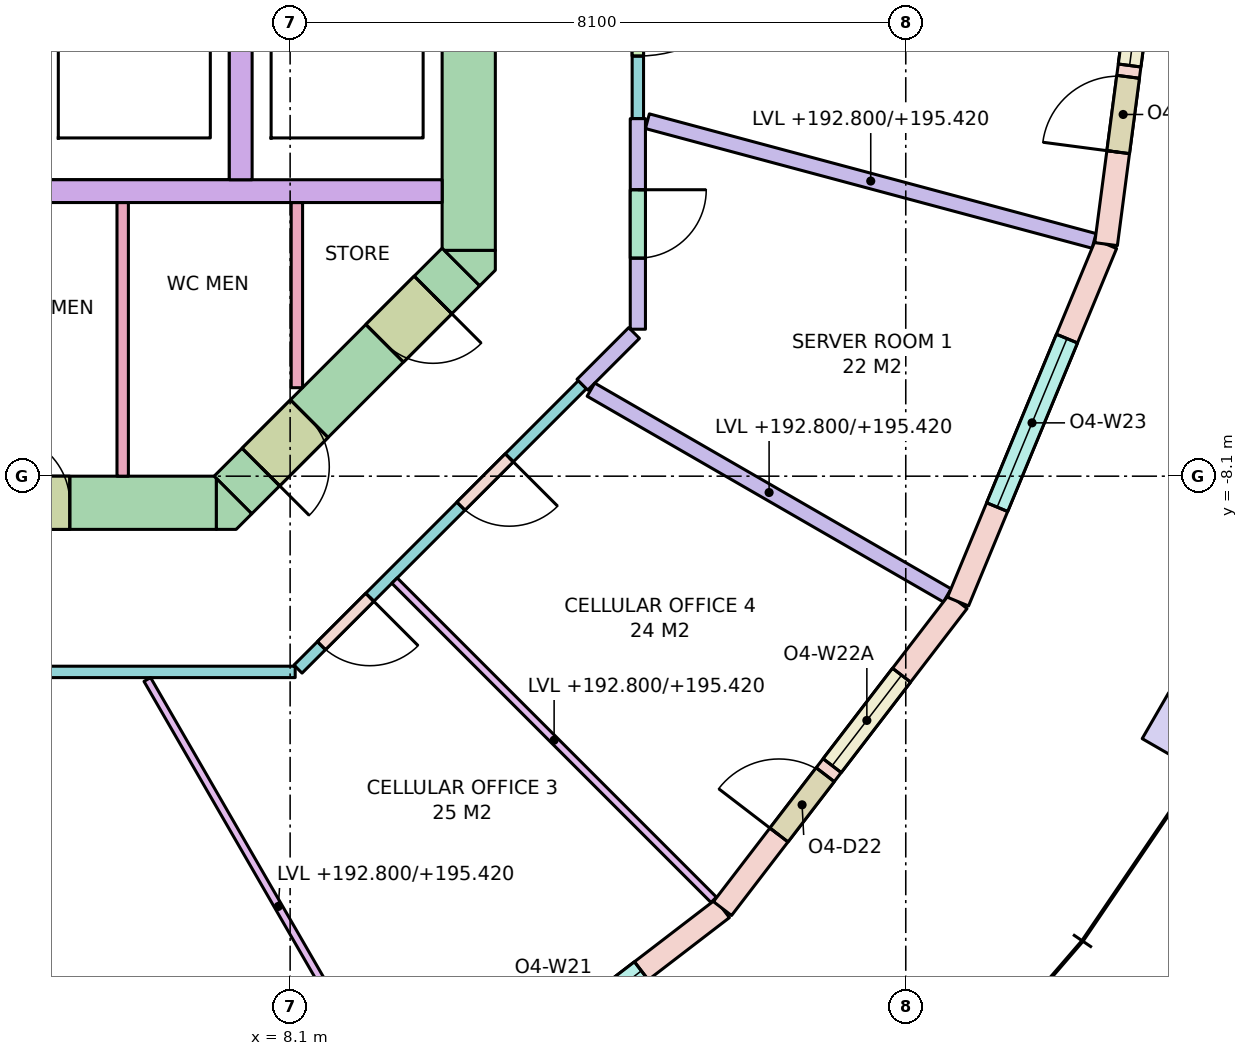
"""IFC4 building model, lengths in metres.
Left out: names, types, materials, properties, quantities, classifications, styles, units other than length and angle.
Written with IfcOpenShell. Run it as: python <this file> out.ifc"""

import sys

from ifc_helpers import new_model, si_unit, direction, frame, frame_2d, origin, origin_2d, place, context, subcontext, project, spatial, polyline, rectangle, outline, extrude, element, fill, save


model = new_model("IFC4")
c1 = context("Model", 3, precision=1e-05, world=origin(), true_north=direction((0.0, 1.0)))
c2 = subcontext(c1, "Body", "Model", "MODEL_VIEW")
j1 = project(units=[si_unit("LENGTHUNIT", "METRE"), si_unit("PLANEANGLEUNIT", "RADIAN")], contexts=[c1])
p1 = place(None, origin())
s1 = spatial("IfcSite", under=j1, at=p1, CompositionType="ELEMENT")
p2 = place(p1, origin())
s2 = spatial("IfcBuilding", under=s1, at=p2, CompositionType="ELEMENT")
p3 = place(p2, frame((0.0, 0.0, 192.8)))
s3 = spatial("IfcBuildingStorey", under=s2, at=p3, CompositionType="ELEMENT", Elevation=192.8)
p4 = place(p3, frame((19.919, -11.5, 0.0), z_axis=(0.0, 0.0, 1.0), x_axis=(0.5, 0.866025403784, 0.0)))
e1 = element("IfcColumn", 1, at=p4, inside=s3, PredefinedType="COLUMN", context=c2, shape_type="SweptSolid", body=[
    extrude(rectangle(XDim=0.7, YDim=1.0, at=origin_2d()), origin(), (0.0, 0.0, 1.0), 3.7),
])
p5 = place(p3, frame((-7.13, -8.45, -0.28), z_axis=(0.0, 0.0, 1.0), x_axis=(1.0, 0.0, 0.0)))
e2 = element("IfcWall", 2, at=p5, inside=s3, PredefinedType="SHEAR", context=c2, shape_type="SweptSolid", body=[
    extrude(rectangle(XDim=14.26, YDim=0.7, at=frame_2d((7.13, 0.0))), origin(), (0.0, 0.0, 1.0), 3.7),
])
p6 = place(p5, frame((8.08, 0.0, 0.28)))
e3 = element("IfcOpeningElement", 3, at=p6, cuts=e2, PredefinedType="OPENING", context=c2, shape_type="SweptSolid", body=[
    extrude(rectangle(XDim=0.7, YDim=2.1, at=frame_2d((0.35, 1.05))), frame((0.0, 0.36, 0.0), z_axis=(0.0, -1.0, 0.0), x_axis=(1.0, 0.0, 0.0)), (0.0, 0.0, 1.0), 0.72),
])
p7 = place(p5, frame((6.205, 0.0, 0.28)))
e4 = element("IfcOpeningElement", 4, at=p7, cuts=e2, PredefinedType="OPENING", context=c2, shape_type="SweptSolid", body=[
    extrude(rectangle(XDim=0.9, YDim=2.1, at=frame_2d((0.45, 1.05))), frame((0.0, 0.36, 0.0), z_axis=(0.0, -1.0, 0.0), x_axis=(1.0, 0.0, 0.0)), (0.0, 0.0, 1.0), 0.72),
])
p8 = place(p5, frame((9.445, 0.0, 0.28)))
e5 = element("IfcOpeningElement", 5, at=p8, cuts=e2, PredefinedType="OPENING", context=c2, shape_type="SweptSolid", body=[
    extrude(rectangle(XDim=0.9, YDim=2.1, at=frame_2d((0.45, 1.05))), frame((0.0, 0.36, 0.0), z_axis=(0.0, -1.0, 0.0), x_axis=(1.0, 0.0, 0.0)), (0.0, 0.0, 1.0), 0.72),
])
p9 = place(p5, frame((11.431, 0.0, 0.28)))
e6 = element("IfcOpeningElement", 6, at=p9, cuts=e2, PredefinedType="OPENING", context=c2, shape_type="SweptSolid", body=[
    extrude(rectangle(XDim=0.9, YDim=2.1, at=frame_2d((0.45, 1.05))), frame((0.0, 0.36, 0.0), z_axis=(0.0, -1.0, 0.0), x_axis=(1.0, 0.0, 0.0)), (0.0, 0.0, 1.0), 0.72),
])
p10 = place(p3, frame((10.45, -5.13, -0.28), z_axis=(0.0, 0.0, 1.0), x_axis=(0.0, 1.0, 0.0)))
e7 = element("IfcWall", 7, at=p10, inside=s3, PredefinedType="SHEAR", context=c2, shape_type="SweptSolid", body=[
    extrude(rectangle(XDim=10.26, YDim=0.7, at=frame_2d((5.13, 0.0))), origin(), (0.0, 0.0, 1.0), 3.7),
])
p11 = place(p10, frame((4.13, 0.0, 0.28)))
e8 = element("IfcOpeningElement", 8, at=p11, cuts=e7, PredefinedType="OPENING", context=c2, shape_type="SweptSolid", body=[
    extrude(rectangle(XDim=2.0, YDim=2.1, at=frame_2d((1.0, 1.05))), frame((0.0, 0.36, 0.0), z_axis=(0.0, -1.0, 0.0), x_axis=(1.0, 0.0, 0.0)), (0.0, 0.0, 1.0), 0.72),
])
p12 = place(p3, frame((10.347, -5.347, -0.28), z_axis=(0.0, 0.0, 1.0), x_axis=(-0.707106781187, -0.707106781187, 0.0)))
e9 = element("IfcWall", 9, at=p12, inside=s3, PredefinedType="SHEAR", context=c2, shape_type="SweptSolid", body=[
    extrude(rectangle(XDim=4.243, YDim=0.7, at=frame_2d((2.121, 0.0))), origin(), (0.0, 0.0, 1.0), 3.7),
])
p13 = place(p12, frame((2.823, 0.0, 0.28)))
e10 = element("IfcOpeningElement", 10, at=p13, cuts=e9, PredefinedType="OPENING", context=c2, shape_type="SweptSolid", body=[
    extrude(rectangle(XDim=0.9, YDim=2.1, at=frame_2d((0.45, 1.05))), frame((0.0, 0.36, 0.0), z_axis=(0.0, -1.0, 0.0), x_axis=(1.0, 0.0, 0.0)), (0.0, 0.0, 1.0), 0.72),
])
p14 = place(p12, frame((0.52, 0.0, 0.28)))
e11 = element("IfcOpeningElement", 11, at=p14, cuts=e9, PredefinedType="OPENING", context=c2, shape_type="SweptSolid", body=[
    extrude(rectangle(XDim=0.9, YDim=2.1, at=frame_2d((0.45, 1.05))), frame((0.0, 0.36, 0.0), z_axis=(0.0, -1.0, 0.0), x_axis=(1.0, 0.0, 0.0)), (0.0, 0.0, 1.0), 0.72),
])
p15 = place(p3, frame((0.0, 0.0, -0.28)))
e12 = element("IfcWall", 12, at=p15, inside=s3, PredefinedType="SHEAR", context=c2, shape_type="SweptSolid", body=[
    extrude(outline(polyline([(7.39, -8.8), (7.13, -8.8), (7.13, -8.8), (7.13, -8.13), (7.595, -8.595), (7.595, -8.595), (7.595, -8.595), (7.39, -8.8)])), origin(), (0.0, 0.0, 1.0), 3.7),
])
p16 = place(p3, frame((0.0, 0.0, -0.28)))
e13 = element("IfcWall", 13, at=p16, inside=s3, PredefinedType="SHEAR", context=c2, shape_type="SweptSolid", body=[
    extrude(outline(polyline([(10.8, -5.39), (10.595, -5.595), (10.595, -5.595), (10.595, -5.595), (10.13, -5.13), (10.8, -5.13), (10.8, -5.13), (10.8, -5.39)])), origin(), (0.0, 0.0, 1.0), 3.7),
])
p17 = place(p3, frame((2.0, -4.35, 0.0), z_axis=(0.0, 0.0, 1.0), x_axis=(1.0, 0.0, 0.0)))
e14 = element("IfcWall", 14, at=p17, inside=s3, PredefinedType="SOLIDWALL", context=c2, shape_type="SweptSolid", body=[
    extrude(rectangle(XDim=8.1, YDim=0.3, at=frame_2d((4.05, 0.0))), origin(), (0.0, 0.0, 1.0), 3.42),
])
p18 = place(p3, frame((7.45, -4.2, 0.0), z_axis=(0.0, 0.0, 1.0), x_axis=(0.0, 1.0, 0.0)))
e15 = element("IfcWall", 15, at=p18, inside=s3, PredefinedType="SOLIDWALL", context=c2, shape_type="SweptSolid", body=[
    extrude(rectangle(XDim=2.4, YDim=0.3, at=frame_2d((1.2, 0.0))), origin(), (0.0, 0.0, 1.0), 3.42),
])
p19 = place(p3, frame((9.75, -16.887, 0.0), z_axis=(0.0, 0.0, 1.0), x_axis=(0.79335619014, 0.608757714995, 0.0)))
e16 = element("IfcWall", 16, at=p19, inside=s3, PredefinedType="STANDARD", context=c2, shape_type="SweptSolid", body=[
    extrude(rectangle(XDim=5.091, YDim=0.3, at=frame_2d((2.545, 0.0))), origin(), (0.0, 0.0, 1.0), 3.42),
])
p20 = place(p19, frame((1.345, 0.0, 0.8)))
e17 = element("IfcOpeningElement", 17, at=p20, cuts=e16, PredefinedType="OPENING", context=c2, shape_type="SweptSolid", body=[
    extrude(rectangle(XDim=2.4, YDim=2.4, at=frame_2d((1.2, 1.2))), frame((0.0, 0.16, 0.0), z_axis=(0.0, -1.0, 0.0), x_axis=(1.0, 0.0, 0.0)), (0.0, 0.0, 1.0), 0.32),
])
p21 = place(p3, frame((13.789, -13.789, 0.0), z_axis=(0.0, 0.0, 1.0), x_axis=(0.608757714995, 0.79335619014, 0.0)))
e18 = element("IfcWall", 18, at=p21, inside=s3, PredefinedType="STANDARD", context=c2, shape_type="SweptSolid", body=[
    extrude(rectangle(XDim=5.091, YDim=0.3, at=frame_2d((2.545, 0.0))), origin(), (0.0, 0.0, 1.0), 3.42),
])
p22 = place(p21, frame((1.22, 0.0, 0.0)))
e19 = element("IfcOpeningElement", 19, at=p22, cuts=e18, PredefinedType="OPENING", context=c2, shape_type="SweptSolid", body=[
    extrude(rectangle(XDim=1.0, YDim=2.4, at=frame_2d((0.5, 1.2))), frame((0.0, 0.16, 0.0), z_axis=(0.0, -1.0, 0.0), x_axis=(1.0, 0.0, 0.0)), (0.0, 0.0, 1.0), 0.32),
])
p23 = place(p21, frame((2.37, 0.0, 0.8)))
e20 = element("IfcOpeningElement", 20, at=p23, cuts=e18, PredefinedType="OPENING", context=c2, shape_type="SweptSolid", body=[
    extrude(rectangle(XDim=1.5, YDim=2.4, at=frame_2d((0.75, 1.2))), frame((0.0, 0.16, 0.0), z_axis=(0.0, -1.0, 0.0), x_axis=(1.0, 0.0, 0.0)), (0.0, 0.0, 1.0), 0.32),
])
p24 = place(p3, frame((16.887, -9.75, 0.0), z_axis=(0.0, 0.0, 1.0), x_axis=(0.382724538613, 0.923862504675, 0.0)))
e21 = element("IfcWall", 21, at=p24, inside=s3, PredefinedType="STANDARD", context=c2, shape_type="SweptSolid", body=[
    extrude(rectangle(XDim=5.091, YDim=0.3, at=frame_2d((2.545, 0.0))), origin(), (0.0, 0.0, 1.0), 3.42),
])
p25 = place(p24, frame((1.345, 0.0, 0.8)))
e22 = element("IfcOpeningElement", 22, at=p25, cuts=e21, PredefinedType="OPENING", context=c2, shape_type="SweptSolid", body=[
    extrude(rectangle(XDim=2.4, YDim=2.4, at=frame_2d((1.2, 1.2))), frame((0.0, 0.16, 0.0), z_axis=(0.0, -1.0, 0.0), x_axis=(1.0, 0.0, 0.0)), (0.0, 0.0, 1.0), 0.32),
])
p26 = place(p3, frame((18.836, -5.047, 0.0), z_axis=(0.0, 0.0, 1.0), x_axis=(0.130495451964, 0.99144890792, 0.0)))
e23 = element("IfcWall", 23, at=p26, inside=s3, PredefinedType="STANDARD", context=c2, shape_type="SweptSolid", body=[
    extrude(rectangle(XDim=5.091, YDim=0.3, at=frame_2d((2.545, 0.0))), origin(), (0.0, 0.0, 1.0), 3.42),
])
p27 = place(p26, frame((1.22, 0.0, 0.0)))
e24 = element("IfcOpeningElement", 24, at=p27, cuts=e23, PredefinedType="OPENING", context=c2, shape_type="SweptSolid", body=[
    extrude(rectangle(XDim=1.0, YDim=2.4, at=frame_2d((0.5, 1.2))), frame((0.0, 0.16, 0.0), z_axis=(0.0, -1.0, 0.0), x_axis=(1.0, 0.0, 0.0)), (0.0, 0.0, 1.0), 0.32),
])
p28 = place(p26, frame((2.37, 0.0, 0.8)))
e25 = element("IfcOpeningElement", 25, at=p28, cuts=e23, PredefinedType="OPENING", context=c2, shape_type="SweptSolid", body=[
    extrude(rectangle(XDim=1.5, YDim=2.4, at=frame_2d((0.75, 1.2))), frame((0.0, 0.16, 0.0), z_axis=(0.0, -1.0, 0.0), x_axis=(1.0, 0.0, 0.0)), (0.0, 0.0, 1.0), 0.32),
])
p29 = place(p3, frame((5.897, -8.1, 0.0), z_axis=(0.0, 0.0, 1.0), x_axis=(0.0, 1.0, 0.0)))
e26 = element("IfcWall", 26, at=p29, inside=s3, PredefinedType="PARTITIONING", context=c2, shape_type="SweptSolid", body=[
    extrude(rectangle(XDim=3.6, YDim=0.15, at=frame_2d((1.8, 0.0))), origin(), (0.0, 0.0, 1.0), 3.42),
])
p30 = place(p3, frame((8.189, -6.936, 0.0), z_axis=(0.0, 0.0, 1.0), x_axis=(0.0, 1.0, 0.0)))
e27 = element("IfcWall", 27, at=p30, inside=s3, PredefinedType="PARTITIONING", context=c2, shape_type="SweptSolid", body=[
    extrude(rectangle(XDim=2.436, YDim=0.15, at=frame_2d((1.218, 0.0))), origin(), (0.0, 0.0, 1.0), 3.42),
])
p31 = place(p3, frame((12.625, -6.216, 0.0), z_axis=(0.0, 0.0, 1.0), x_axis=(-0.707106781187, -0.707106781187, 0.0)))
e28 = element("IfcWall", 28, at=p31, inside=s3, PredefinedType="PARTITIONING", context=c2, shape_type="SweptSolid", body=[
    extrude(rectangle(XDim=0.962, YDim=0.2, at=frame_2d((0.481, 0.0))), origin(), (0.0, 0.0, 1.0), 2.62),
])
p32 = place(p3, frame((11.945, -6.896, 0.0), z_axis=(0.0, 0.0, 1.0), x_axis=(-0.707106781187, -0.707106781187, 0.0)))
e29 = element("IfcWall", 29, at=p32, inside=s3, PredefinedType="PARTITIONING", context=c2, shape_type="SweptSolid", body=[
    extrude(rectangle(XDim=5.291, YDim=0.15, at=frame_2d((2.646, 0.0))), origin(), (0.0, 0.0, 1.0), 2.62),
])
p33 = place(p32, frame((3.956, 0.0, 0.0)))
e30 = element("IfcOpeningElement", 30, at=p33, cuts=e29, PredefinedType="OPENING", context=c2, shape_type="SweptSolid", body=[
    extrude(rectangle(XDim=0.9, YDim=2.1, at=frame_2d((0.45, 1.05))), frame((0.0, 0.085, 0.0), z_axis=(0.0, -1.0, 0.0), x_axis=(1.0, 0.0, 0.0)), (0.0, 0.0, 1.0), 0.17),
])
p34 = place(p32, frame((1.36, 0.0, 0.0)))
e31 = element("IfcOpeningElement", 31, at=p34, cuts=e29, PredefinedType="OPENING", context=c2, shape_type="SweptSolid", body=[
    extrude(rectangle(XDim=0.9, YDim=2.1, at=frame_2d((0.45, 1.05))), frame((0.0, 0.085, 0.0), z_axis=(0.0, -1.0, 0.0), x_axis=(1.0, 0.0, 0.0)), (0.0, 0.0, 1.0), 0.17),
])
p35 = place(p3, frame((8.167, -10.675, 0.0), z_axis=(0.0, 0.0, 1.0), x_axis=(-1.0, 0.0, 0.0)))
e32 = element("IfcWall", 32, at=p35, inside=s3, PredefinedType="PARTITIONING", context=c2, shape_type="SweptSolid", body=[
    extrude(rectangle(XDim=16.333, YDim=0.15, at=frame_2d((8.167, 0.0))), origin(), (0.0, 0.0, 1.0), 2.62),
])
p36 = place(p35, frame((11.325, 0.0, 0.0)))
e33 = element("IfcOpeningElement", 33, at=p36, cuts=e32, PredefinedType="OPENING", context=c2, shape_type="SweptSolid", body=[
    extrude(rectangle(XDim=1.8, YDim=2.1, at=frame_2d((0.9, 1.05))), frame((0.0, 0.085, 0.0), z_axis=(0.0, -1.0, 0.0), x_axis=(1.0, 0.0, 0.0)), (0.0, 0.0, 1.0), 0.17),
])
p37 = place(p35, frame((4.581, 0.0, 0.0)))
e34 = element("IfcOpeningElement", 34, at=p37, cuts=e32, PredefinedType="OPENING", context=c2, shape_type="SweptSolid", body=[
    extrude(rectangle(XDim=1.0, YDim=2.1, at=frame_2d((0.5, 1.05))), frame((0.0, 0.085, 0.0), z_axis=(0.0, -1.0, 0.0), x_axis=(1.0, 0.0, 0.0)), (0.0, 0.0, 1.0), 0.17),
])
p38 = place(p3, frame((12.675, 6.167, 0.0), z_axis=(0.0, 0.0, 1.0), x_axis=(0.0, -1.0, 0.0)))
e35 = element("IfcWall", 35, at=p38, inside=s3, PredefinedType="PARTITIONING", context=c2, shape_type="SweptSolid", body=[
    extrude(rectangle(XDim=9.563, YDim=0.15, at=frame_2d((4.781, 0.0))), origin(), (0.0, 0.0, 1.0), 2.62),
])
p39 = place(p38, frame((6.94, 0.0, 0.0)))
e36 = element("IfcOpeningElement", 36, at=p39, cuts=e35, PredefinedType="OPENING", context=c2, shape_type="SweptSolid", body=[
    extrude(rectangle(XDim=1.8, YDim=2.1, at=frame_2d((0.9, 1.05))), frame((0.0, 0.085, 0.0), z_axis=(0.0, -1.0, 0.0), x_axis=(1.0, 0.0, 0.0)), (0.0, 0.0, 1.0), 0.17),
])
p40 = place(p38, frame((4.018, 0.0, 0.0)))
e37 = element("IfcOpeningElement", 37, at=p40, cuts=e35, PredefinedType="OPENING", context=c2, shape_type="SweptSolid", body=[
    extrude(rectangle(XDim=0.9, YDim=2.1, at=frame_2d((0.45, 1.05))), frame((0.0, 0.085, 0.0), z_axis=(0.0, -1.0, 0.0), x_axis=(1.0, 0.0, 0.0)), (0.0, 0.0, 1.0), 0.17),
])
p41 = place(p38, frame((0.96, 0.0, 0.0)))
e38 = element("IfcOpeningElement", 38, at=p41, cuts=e35, PredefinedType="OPENING", context=c2, shape_type="SweptSolid", body=[
    extrude(rectangle(XDim=0.9, YDim=2.1, at=frame_2d((0.45, 1.05))), frame((0.0, 0.085, 0.0), z_axis=(0.0, -1.0, 0.0), x_axis=(1.0, 0.0, 0.0)), (0.0, 0.0, 1.0), 0.17),
])
p42 = place(p3, frame((12.675, -3.396, 0.0), z_axis=(0.0, 0.0, 1.0), x_axis=(0.0, -1.0, 0.0)))
e39 = element("IfcWall", 39, at=p42, inside=s3, PredefinedType="PARTITIONING", context=c2, shape_type="SweptSolid", body=[
    extrude(rectangle(XDim=2.77, YDim=0.2, at=frame_2d((1.385, 0.0))), origin(), (0.0, 0.0, 1.0), 2.62),
])
p43 = place(p42, frame((0.935, 0.0, 0.0)))
e40 = element("IfcOpeningElement", 40, at=p43, cuts=e39, PredefinedType="OPENING", context=c2, shape_type="SweptSolid", body=[
    extrude(rectangle(XDim=0.9, YDim=2.1, at=frame_2d((0.45, 1.05))), frame((0.0, 0.11, 0.0), z_axis=(0.0, -1.0, 0.0), x_axis=(1.0, 0.0, 0.0)), (0.0, 0.0, 1.0), 0.22),
])
p44 = place(p3, frame((6.221, -10.775, 0.0), z_axis=(0.0, 0.0, 1.0), x_axis=(0.500015661236, -0.866016361577, 0.0)))
e41 = element("IfcWall", 41, at=p44, inside=s3, PredefinedType="PARTITIONING", context=c2, shape_type="SweptSolid", body=[
    extrude(rectangle(XDim=6.895, YDim=0.1, at=frame_2d((3.448, 0.0))), origin(), (0.0, 0.0, 1.0), 2.62),
])
p45 = place(p3, frame((9.474, -9.474, 0.0), z_axis=(0.0, 0.0, 1.0), x_axis=(0.707106781187, -0.707106781187, 0.0)))
e42 = element("IfcWall", 42, at=p45, inside=s3, PredefinedType="PARTITIONING", context=c2, shape_type="SweptSolid", body=[
    extrude(rectangle(XDim=5.938, YDim=0.1, at=frame_2d((2.969, 0.0))), origin(), (0.0, 0.0, 1.0), 2.62),
])
p46 = place(p3, frame((12.058, -6.961, 0.0), z_axis=(0.0, 0.0, 1.0), x_axis=(0.86601436245, -0.500019123664, 0.0)))
e43 = element("IfcWall", 43, at=p46, inside=s3, PredefinedType="PARTITIONING", context=c2, shape_type="SweptSolid", body=[
    extrude(rectangle(XDim=5.414, YDim=0.2, at=frame_2d((2.707, 0.0))), origin(), (0.0, 0.0, 1.0), 2.62),
])
p47 = place(p3, frame((12.801, -3.43, 0.0), z_axis=(0.0, 0.0, 1.0), x_axis=(0.965929245953, -0.258806282407, 0.0)))
e44 = element("IfcWall", 44, at=p47, inside=s3, PredefinedType="PARTITIONING", context=c2, shape_type="SweptSolid", body=[
    extrude(rectangle(XDim=6.084, YDim=0.2, at=frame_2d((3.042, 0.0))), origin(), (0.0, 0.0, 1.0), 2.62),
])
p48 = place(p20, origin())
e45 = element("IfcWindow", 45, at=p48, inside=s3, PartitioningType="SINGLE_PANEL", PredefinedType="WINDOW", context=c2, shape_type="SweptSolid", body=[
    extrude(rectangle(XDim=2.4, YDim=2.4, at=frame_2d((1.2, 1.2))), frame((0.0, 0.03, 0.0), z_axis=(0.0, -1.0, 0.0), x_axis=(1.0, 0.0, 0.0)), (0.0, 0.0, 1.0), 0.06),
])
fill(e17, e45)
p49 = place(p22, origin())
e46 = element("IfcDoor", 46, at=p49, inside=s3, OperationType="SINGLE_SWING_LEFT", PredefinedType="DOOR", context=c2, shape_type="SweptSolid", body=[
    extrude(rectangle(XDim=1.0, YDim=2.4, at=frame_2d((0.5, 1.2))), frame((0.0, 0.025, 0.0), z_axis=(0.0, -1.0, 0.0), x_axis=(1.0, 0.0, 0.0)), (0.0, 0.0, 1.0), 0.05),
])
fill(e19, e46)
p50 = place(p23, origin())
e47 = element("IfcWindow", 47, at=p50, inside=s3, PartitioningType="SINGLE_PANEL", PredefinedType="WINDOW", context=c2, shape_type="SweptSolid", body=[
    extrude(rectangle(XDim=1.5, YDim=2.4, at=frame_2d((0.75, 1.2))), frame((0.0, 0.03, 0.0), z_axis=(0.0, -1.0, 0.0), x_axis=(1.0, 0.0, 0.0)), (0.0, 0.0, 1.0), 0.06),
])
fill(e20, e47)
p51 = place(p25, origin())
e48 = element("IfcWindow", 48, at=p51, inside=s3, PartitioningType="SINGLE_PANEL", PredefinedType="WINDOW", context=c2, shape_type="SweptSolid", body=[
    extrude(rectangle(XDim=2.4, YDim=2.4, at=frame_2d((1.2, 1.2))), frame((0.0, 0.03, 0.0), z_axis=(0.0, -1.0, 0.0), x_axis=(1.0, 0.0, 0.0)), (0.0, 0.0, 1.0), 0.06),
])
fill(e22, e48)
p52 = place(p27, origin())
e49 = element("IfcDoor", 49, at=p52, inside=s3, OperationType="SINGLE_SWING_LEFT", PredefinedType="DOOR", context=c2, shape_type="SweptSolid", body=[
    extrude(rectangle(XDim=1.0, YDim=2.4, at=frame_2d((0.5, 1.2))), frame((0.0, 0.025, 0.0), z_axis=(0.0, -1.0, 0.0), x_axis=(1.0, 0.0, 0.0)), (0.0, 0.0, 1.0), 0.05),
])
fill(e24, e49)
p53 = place(p28, origin())
e50 = element("IfcWindow", 50, at=p53, inside=s3, PartitioningType="SINGLE_PANEL", PredefinedType="WINDOW", context=c2, shape_type="SweptSolid", body=[
    extrude(rectangle(XDim=1.5, YDim=2.4, at=frame_2d((0.75, 1.2))), frame((0.0, 0.03, 0.0), z_axis=(0.0, -1.0, 0.0), x_axis=(1.0, 0.0, 0.0)), (0.0, 0.0, 1.0), 0.06),
])
fill(e25, e50)
p54 = place(p9, origin())
e51 = element("IfcDoor", 51, at=p54, inside=s3, OperationType="SINGLE_SWING_LEFT", PredefinedType="DOOR", context=c2, shape_type="SweptSolid", body=[
    extrude(rectangle(XDim=0.9, YDim=2.1, at=frame_2d((0.45, 1.05))), frame((0.0, 0.025, 0.0), z_axis=(0.0, -1.0, 0.0), x_axis=(1.0, 0.0, 0.0)), (0.0, 0.0, 1.0), 0.05),
])
fill(e6, e51)
p55 = place(p13, origin())
e52 = element("IfcDoor", 52, at=p55, inside=s3, OperationType="SINGLE_SWING_RIGHT", PredefinedType="DOOR", context=c2, shape_type="SweptSolid", body=[
    extrude(rectangle(XDim=0.9, YDim=2.1, at=frame_2d((0.45, 1.05))), frame((0.0, 0.025, 0.0), z_axis=(0.0, -1.0, 0.0), x_axis=(1.0, 0.0, 0.0)), (0.0, 0.0, 1.0), 0.05),
])
fill(e10, e52)
p56 = place(p14, origin())
e53 = element("IfcDoor", 53, at=p56, inside=s3, OperationType="SINGLE_SWING_LEFT", PredefinedType="DOOR", context=c2, shape_type="SweptSolid", body=[
    extrude(rectangle(XDim=0.9, YDim=2.1, at=frame_2d((0.45, 1.05))), frame((0.0, 0.025, 0.0), z_axis=(0.0, -1.0, 0.0), x_axis=(1.0, 0.0, 0.0)), (0.0, 0.0, 1.0), 0.05),
])
fill(e11, e53)
p57 = place(p33, origin())
e54 = element("IfcDoor", 54, at=p57, inside=s3, OperationType="SINGLE_SWING_LEFT", PredefinedType="DOOR", context=c2, shape_type="SweptSolid", body=[
    extrude(rectangle(XDim=0.9, YDim=2.1, at=frame_2d((0.45, 1.05))), frame((0.0, 0.025, 0.0), z_axis=(0.0, -1.0, 0.0), x_axis=(1.0, 0.0, 0.0)), (0.0, 0.0, 1.0), 0.05),
])
fill(e30, e54)
p58 = place(p34, origin())
e55 = element("IfcDoor", 55, at=p58, inside=s3, OperationType="SINGLE_SWING_LEFT", PredefinedType="DOOR", context=c2, shape_type="SweptSolid", body=[
    extrude(rectangle(XDim=0.9, YDim=2.1, at=frame_2d((0.45, 1.05))), frame((0.0, 0.025, 0.0), z_axis=(0.0, -1.0, 0.0), x_axis=(1.0, 0.0, 0.0)), (0.0, 0.0, 1.0), 0.05),
])
fill(e31, e55)
p59 = place(p43, origin())
e56 = element("IfcDoor", 56, at=p59, inside=s3, OperationType="SINGLE_SWING_LEFT", PredefinedType="DOOR", context=c2, shape_type="SweptSolid", body=[
    extrude(rectangle(XDim=0.9, YDim=2.1, at=frame_2d((0.45, 1.05))), frame((0.0, 0.025, 0.0), z_axis=(0.0, -1.0, 0.0), x_axis=(1.0, 0.0, 0.0)), (0.0, 0.0, 1.0), 0.05),
])
fill(e40, e56)
p60 = place(p39, origin())
e57 = element("IfcDoor", 57, at=p60, inside=s3, OperationType="DOUBLE_DOOR_SINGLE_SWING", PredefinedType="DOOR", context=c2, shape_type="SweptSolid", body=[
    extrude(rectangle(XDim=1.8, YDim=2.1, at=frame_2d((0.9, 1.05))), frame((0.0, 0.025, 0.0), z_axis=(0.0, -1.0, 0.0), x_axis=(1.0, 0.0, 0.0)), (0.0, 0.0, 1.0), 0.05),
])
fill(e36, e57)
save(model, sys.argv[1])
